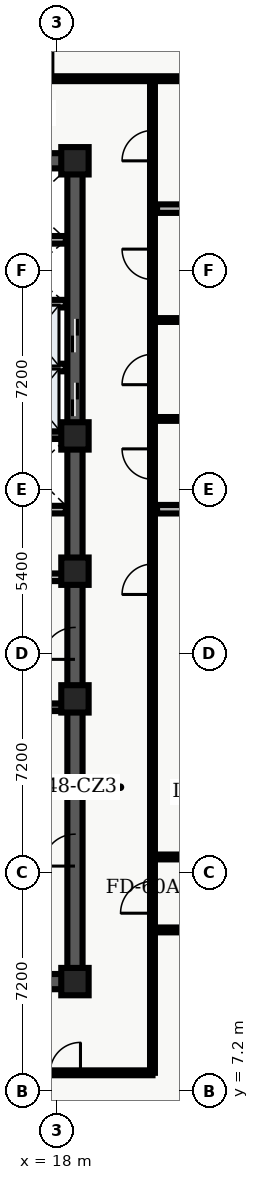
"""IFC4 building model, lengths in metres.
Left out: names, types, materials, properties, quantities, classifications, styles, units other than length and angle.
Written with IfcOpenShell. Run it as: python <this file> out.ifc"""

import sys

from ifc_helpers import new_model, entity, si_unit, converted_unit, direction, frame, origin_with_axes, origin_2d_with_axis, place, context, subcontext, project, spatial, polyline, rectangle, outline, extrude, element, fill, save


model = new_model("IFC4")
c1 = context("Model", 3, precision=1e-05, world=origin_with_axes(), true_north=direction((0.0, 1.0)))
c2 = subcontext(c1, "Body", "Model", "MODEL_VIEW")
j1 = project(units=[si_unit("LENGTHUNIT", "METRE"), converted_unit("PLANEANGLEUNIT", "DEGREE", entity("IfcPlaneAngleMeasure", 0.017), si_unit("PLANEANGLEUNIT", "RADIAN"), dimensions=[0, 0, 0, 0, 0, 0, 0])], contexts=[c1])
p1 = place(None, origin_with_axes())
s1 = spatial("IfcSite", under=j1, at=p1, CompositionType="ELEMENT")
p2 = place(p1, origin_with_axes())
s2 = spatial("IfcBuilding", under=s1, at=p2, CompositionType="ELEMENT")
p3 = place(p2, frame((0.0, 0.0, 196.5), z_axis=(0.0, 0.0, 1.0), x_axis=(1.0, 0.0, 0.0)))
s3 = spatial("IfcBuildingStorey", under=s2, at=p3, CompositionType="ELEMENT", Elevation=196.5)
p4 = place(p3, frame((11.4, 10.8, 0.0), z_axis=(0.0, 0.0, 1.0), x_axis=(1.0, 0.0, 0.0)))
e1 = element("IfcWall", 1, at=p4, inside=s3, PredefinedType="SHEAR", context=c2, shape_type="SweptSolid", body=[
    extrude(outline(polyline([(0.0, -0.25), (7.2, -0.25), (7.2, 0.25), (0.0, 0.25), (0.0, -0.25)])), origin_with_axes(), (0.0, 0.0, 1.0), 3.66),
])
p5 = place(p4, frame((2.625, 0.0, 0.0), z_axis=(0.0, 0.0, 1.0), x_axis=(1.0, 0.0, 0.0)))
e2 = element("IfcOpeningElement", 2, at=p5, cuts=e1, PredefinedType="OPENING", context=c2, shape_type="SweptSolid", body=[
    extrude(rectangle(XDim=1.05, YDim=0.52, at=origin_2d_with_axis()), origin_with_axes(), (0.0, 0.0, 1.0), 2.15),
])
p6 = place(p3, frame((11.4, 37.8, 0.0), z_axis=(0.0, 0.0, 1.0), x_axis=(1.0, 0.0, 0.0)))
e3 = element("IfcWall", 3, at=p6, inside=s3, PredefinedType="SHEAR", context=c2, shape_type="SweptSolid", body=[
    extrude(outline(polyline([(0.0, -0.25), (7.2, -0.25), (7.2, 0.25), (0.0, 0.25), (0.0, -0.25)])), origin_with_axes(), (0.0, 0.0, 1.0), 3.66),
])
p7 = place(p6, frame((2.625, 0.0, 0.0), z_axis=(0.0, 0.0, 1.0), x_axis=(1.0, 0.0, 0.0)))
e4 = element("IfcOpeningElement", 4, at=p7, cuts=e3, PredefinedType="OPENING", context=c2, shape_type="SweptSolid", body=[
    extrude(rectangle(XDim=1.05, YDim=0.52, at=origin_2d_with_axis()), origin_with_axes(), (0.0, 0.0, 1.0), 2.15),
])
p8 = place(p3, frame((18.6, 10.8, 0.0), z_axis=(0.0, 0.0, 1.0), x_axis=(0.0, 1.0, 0.0)))
e5 = element("IfcWall", 5, at=p8, inside=s3, PredefinedType="SHEAR", context=c2, shape_type="SweptSolid", body=[
    extrude(outline(polyline([(0.0, -0.25), (13.5, -0.25), (13.5, 0.25), (0.0, 0.25), (0.0, -0.25)])), origin_with_axes(), (0.0, 0.0, 1.0), 3.66),
])
p9 = place(p8, frame((11.125, 0.0, 0.0), z_axis=(0.0, 0.0, 1.0), x_axis=(1.0, 0.0, 0.0)))
e6 = element("IfcOpeningElement", 6, at=p9, cuts=e5, PredefinedType="OPENING", context=c2, shape_type="SweptSolid", body=[
    extrude(rectangle(XDim=1.05, YDim=0.52, at=origin_2d_with_axis()), origin_with_axes(), (0.0, 0.0, 1.0), 2.15),
])
p10 = place(p8, frame((4.325, 0.0, 0.0), z_axis=(0.0, 0.0, 1.0), x_axis=(1.0, 0.0, 0.0)))
e7 = element("IfcOpeningElement", 7, at=p10, cuts=e5, PredefinedType="OPENING", context=c2, shape_type="SweptSolid", body=[
    extrude(rectangle(XDim=1.05, YDim=0.52, at=origin_2d_with_axis()), origin_with_axes(), (0.0, 0.0, 1.0), 2.15),
])
p11 = place(p3, frame((18.6, 24.3, 0.0), z_axis=(0.0, 0.0, 1.0), x_axis=(0.0, 1.0, 0.0)))
e8 = element("IfcWall", 8, at=p11, inside=s3, PredefinedType="SHEAR", context=c2, shape_type="SweptSolid", body=[
    extrude(outline(polyline([(0.0, -0.25), (13.5, -0.25), (13.5, 0.25), (0.0, 0.25), (0.0, -0.25)])), origin_with_axes(), (0.0, 0.0, 1.0), 3.66),
])
p12 = place(p11, frame((5.65, 0.0, 0.0), z_axis=(0.0, 0.0, 1.0), x_axis=(1.0, 0.0, 0.0)))
e9 = element("IfcOpeningElement", 9, at=p12, cuts=e8, PredefinedType="OPENING", context=c2, shape_type="SweptSolid", body=[
    extrude(rectangle(XDim=1.1, YDim=0.52, at=origin_2d_with_axis()), origin_with_axes(), (0.0, 0.0, 1.0), 2.15),
])
p13 = place(p11, frame((7.75, 0.0, 0.0), z_axis=(0.0, 0.0, 1.0), x_axis=(1.0, 0.0, 0.0)))
e10 = element("IfcOpeningElement", 10, at=p13, cuts=e8, PredefinedType="OPENING", context=c2, shape_type="SweptSolid", body=[
    extrude(rectangle(XDim=1.1, YDim=0.52, at=origin_2d_with_axis()), origin_with_axes(), (0.0, 0.0, 1.0), 2.15),
])
for number, where, z_axis, x_axis in (
    (11, (11.65, 19.825, 0.0), (0.0, 0.0, 1.0), (1.0, 0.0, 0.0)),
    (12, (11.65, 28.775, 0.0), (0.0, 0.0, 1.0), (1.0, 0.0, 0.0)),
):
    element("IfcWall", number, at=place(p3, frame(where, z_axis=z_axis, x_axis=x_axis)), inside=s3, PredefinedType="SHEAR", context=c2, shape_type="SweptSolid", body=[
        extrude(outline(polyline([(0.0, -0.125), (6.7, -0.125), (6.7, 0.125), (0.0, 0.125), (0.0, -0.125)])), origin_with_axes(), (0.0, 0.0, 1.0), 3.66),
    ])
p14 = place(p3, frame((11.7, 24.1, 0.0), z_axis=(0.0, 0.0, 1.0), x_axis=(1.0, 0.0, 0.0)))
e13 = element("IfcWall", 13, at=p14, inside=s3, PredefinedType="SOLIDWALL", context=c2, shape_type="SweptSolid", body=[
    extrude(outline(polyline([(0.0, -0.125), (6.6, -0.125), (6.6, 0.125), (0.0, 0.125), (0.0, -0.125)])), origin_with_axes(), (0.0, 0.0, 1.0), 2.7),
])
p15 = place(p14, frame((3.75, 0.0, 0.0), z_axis=(0.0, 0.0, 1.0), x_axis=(1.0, 0.0, 0.0)))
e14 = element("IfcOpeningElement", 14, at=p15, cuts=e13, PredefinedType="OPENING", context=c2, shape_type="SweptSolid", body=[
    extrude(rectangle(XDim=0.9, YDim=0.27, at=origin_2d_with_axis()), origin_with_axes(), (0.0, 0.0, 1.0), 2.15),
])
p16 = place(p3, frame((11.7, 26.325, 0.0), z_axis=(0.0, 0.0, 1.0), x_axis=(1.0, 0.0, 0.0)))
e15 = element("IfcWall", 15, at=p16, inside=s3, PredefinedType="SOLIDWALL", context=c2, shape_type="SweptSolid", body=[
    extrude(outline(polyline([(0.0, -0.125), (6.6, -0.125), (6.6, 0.125), (0.0, 0.125), (0.0, -0.125)])), origin_with_axes(), (0.0, 0.0, 1.0), 2.7),
])
p17 = place(p16, frame((3.5, 0.0, 0.0), z_axis=(0.0, 0.0, 1.0), x_axis=(1.0, 0.0, 0.0)))
e16 = element("IfcOpeningElement", 16, at=p17, cuts=e15, PredefinedType="OPENING", context=c2, shape_type="SweptSolid", body=[
    extrude(rectangle(XDim=0.9, YDim=0.27, at=origin_2d_with_axis()), origin_with_axes(), (0.0, 0.0, 1.0), 2.15),
])
for number, where, z_axis, x_axis in (
    (17, (18.6, 10.8, 0.0), (0.0, 0.0, 1.0), (1.0, 0.0, 0.0)),
    (18, (18.6, 20.1, 0.0), (0.0, 0.0, 1.0), (1.0, 0.0, 0.0)),
    (19, (18.6, 24.3, 0.0), (0.0, 0.0, 1.0), (1.0, 0.0, 0.0)),
    (20, (18.6, 28.75, 0.0), (0.0, 0.0, 1.0), (1.0, 0.0, 0.0)),
    (21, (18.6, 37.8, 0.0), (0.0, 0.0, 1.0), (1.0, 0.0, 0.0)),
):
    element("IfcColumn", number, at=place(p3, frame(where, z_axis=z_axis, x_axis=x_axis)), inside=s3, PredefinedType="COLUMN", context=c2, shape_type="SweptSolid", body=[
        extrude(rectangle(XDim=0.9, YDim=0.9, at=origin_2d_with_axis()), origin_with_axes(), (0.0, 0.0, 1.0), 3.9),
    ])
for number, where, z_axis, x_axis in (
    (22, (15.84, 31.0, 0.0), (0.0, 0.0, 1.0), (1.0, 0.0, 0.0)),
    (23, (15.84, 33.1, 0.0), (0.0, 0.0, 1.0), (1.0, 0.0, 0.0)),
    (24, (15.84, 35.2, 0.0), (0.0, 0.0, 1.0), (1.0, 0.0, 0.0)),
):
    element("IfcWall", number, at=place(p3, frame(where, z_axis=z_axis, x_axis=x_axis)), inside=s3, PredefinedType="SOLIDWALL", context=c2, shape_type="SweptSolid", body=[
        extrude(outline(polyline([(0.0, -0.125), (2.46, -0.125), (2.46, 0.125), (0.0, 0.125), (0.0, -0.125)])), origin_with_axes(), (0.0, 0.0, 1.0), 2.7),
    ])
p18 = place(p3, frame((2.6, 7.8, 0.0), z_axis=(0.0, 0.0, 1.0), x_axis=(1.0, 0.0, 0.0)))
e25 = element("IfcWall", 25, at=p18, inside=s3, PredefinedType="PARTITIONING", context=c2, shape_type="SweptSolid", body=[
    extrude(outline(polyline([(0.0, -0.08), (18.55, -0.08), (18.55, 0.08), (0.0, 0.08), (0.0, -0.08)])), origin_with_axes(), (0.0, 0.0, 1.0), 2.7),
])
p19 = place(p18, frame((6.426, 0.0, 0.0), z_axis=(0.0, 0.0, 1.0), x_axis=(1.0, 0.0, 0.0)))
e26 = element("IfcOpeningElement", 26, at=p19, cuts=e25, PredefinedType="OPENING", context=c2, shape_type="SweptSolid", body=[
    extrude(rectangle(XDim=1.2, YDim=0.18, at=origin_2d_with_axis()), origin_with_axes(), (0.0, 0.0, 1.0), 2.2),
])
p20 = place(p18, frame((15.681, 0.0, 0.0), z_axis=(0.0, 0.0, 1.0), x_axis=(1.0, 0.0, 0.0)))
e27 = element("IfcOpeningElement", 27, at=p20, cuts=e25, PredefinedType="OPENING", context=c2, shape_type="SweptSolid", body=[
    extrude(rectangle(XDim=1.0, YDim=0.18, at=origin_2d_with_axis()), origin_with_axes(), (0.0, 0.0, 1.0), 2.15),
])
p21 = place(p3, frame((2.6, 40.5, 0.0), z_axis=(0.0, 0.0, 1.0), x_axis=(1.0, 0.0, 0.0)))
e28 = element("IfcWall", 28, at=p21, inside=s3, PredefinedType="PARTITIONING", context=c2, shape_type="SweptSolid", body=[
    extrude(outline(polyline([(0.0, -0.08), (25.444, -0.08), (25.444, 0.08), (0.0, 0.08), (0.0, -0.08)])), origin_with_axes(), (0.0, 0.0, 1.0), 2.7),
])
p22 = place(p21, frame((1.762, 0.0, 0.0), z_axis=(0.0, 0.0, 1.0), x_axis=(1.0, 0.0, 0.0)))
e29 = element("IfcOpeningElement", 29, at=p22, cuts=e28, PredefinedType="OPENING", context=c2, shape_type="SweptSolid", body=[
    extrude(rectangle(XDim=1.0, YDim=0.18, at=origin_2d_with_axis()), origin_with_axes(), (0.0, 0.0, 1.0), 2.15),
])
p23 = place(p21, frame((6.167, 0.0, 0.0), z_axis=(0.0, 0.0, 1.0), x_axis=(1.0, 0.0, 0.0)))
e30 = element("IfcOpeningElement", 30, at=p23, cuts=e28, PredefinedType="OPENING", context=c2, shape_type="SweptSolid", body=[
    extrude(rectangle(XDim=1.0, YDim=0.18, at=origin_2d_with_axis()), origin_with_axes(), (0.0, 0.0, 1.0), 2.15),
])
p24 = place(p21, frame((10.413, 0.0, 0.0), z_axis=(0.0, 0.0, 1.0), x_axis=(1.0, 0.0, 0.0)))
e31 = element("IfcOpeningElement", 31, at=p24, cuts=e28, PredefinedType="OPENING", context=c2, shape_type="SweptSolid", body=[
    extrude(rectangle(XDim=1.0, YDim=0.18, at=origin_2d_with_axis()), origin_with_axes(), (0.0, 0.0, 1.0), 2.15),
])
p25 = place(p21, frame((14.773, 0.0, 0.0), z_axis=(0.0, 0.0, 1.0), x_axis=(1.0, 0.0, 0.0)))
e32 = element("IfcOpeningElement", 32, at=p25, cuts=e28, PredefinedType="OPENING", context=c2, shape_type="SweptSolid", body=[
    extrude(rectangle(XDim=1.0, YDim=0.18, at=origin_2d_with_axis()), origin_with_axes(), (0.0, 0.0, 1.0), 2.15),
])
p26 = place(p3, frame((21.15, 7.8, 0.0), z_axis=(0.0, 0.0, 1.0), x_axis=(0.0, 1.0, 0.0)))
e33 = element("IfcWall", 33, at=p26, inside=s3, PredefinedType="PARTITIONING", context=c2, shape_type="SweptSolid", body=[
    extrude(outline(polyline([(0.0, -0.08), (32.7, -0.08), (32.7, 0.08), (0.0, 0.08), (0.0, -0.08)])), origin_with_axes(), (0.0, 0.0, 1.0), 2.7),
])
p27 = place(p26, frame((16.235, 0.0, 0.0), z_axis=(0.0, 0.0, 1.0), x_axis=(1.0, 0.0, 0.0)))
e34 = element("IfcOpeningElement", 34, at=p27, cuts=e33, PredefinedType="OPENING", context=c2, shape_type="SweptSolid", body=[
    extrude(rectangle(XDim=1.0, YDim=0.18, at=origin_2d_with_axis()), origin_with_axes(), (0.0, 0.0, 1.0), 2.15),
])
p28 = place(p26, frame((20.023, 0.0, 0.0), z_axis=(0.0, 0.0, 1.0), x_axis=(1.0, 0.0, 0.0)))
e35 = element("IfcOpeningElement", 35, at=p28, cuts=e33, PredefinedType="OPENING", context=c2, shape_type="SweptSolid", body=[
    extrude(rectangle(XDim=1.0, YDim=0.18, at=origin_2d_with_axis()), origin_with_axes(), (0.0, 0.0, 1.0), 2.15),
])
p29 = place(p26, frame((23.135, 0.0, 0.0), z_axis=(0.0, 0.0, 1.0), x_axis=(1.0, 0.0, 0.0)))
e36 = element("IfcOpeningElement", 36, at=p29, cuts=e33, PredefinedType="OPENING", context=c2, shape_type="SweptSolid", body=[
    extrude(rectangle(XDim=1.0, YDim=0.18, at=origin_2d_with_axis()), origin_with_axes(), (0.0, 0.0, 1.0), 2.15),
])
p30 = place(p26, frame((26.594, 0.0, 0.0), z_axis=(0.0, 0.0, 1.0), x_axis=(1.0, 0.0, 0.0)))
e37 = element("IfcOpeningElement", 37, at=p30, cuts=e33, PredefinedType="OPENING", context=c2, shape_type="SweptSolid", body=[
    extrude(rectangle(XDim=1.0, YDim=0.18, at=origin_2d_with_axis()), origin_with_axes(), (0.0, 0.0, 1.0), 2.15),
])
p31 = place(p26, frame((30.498, 0.0, 0.0), z_axis=(0.0, 0.0, 1.0), x_axis=(1.0, 0.0, 0.0)))
e38 = element("IfcOpeningElement", 38, at=p31, cuts=e33, PredefinedType="OPENING", context=c2, shape_type="SweptSolid", body=[
    extrude(rectangle(XDim=1.0, YDim=0.18, at=origin_2d_with_axis()), origin_with_axes(), (0.0, 0.0, 1.0), 2.15),
])
p32 = place(p26, frame((5.775, 0.0, 0.0), z_axis=(0.0, 0.0, 1.0), x_axis=(1.0, 0.0, 0.0)))
e39 = element("IfcOpeningElement", 39, at=p32, cuts=e33, PredefinedType="OPENING", context=c2, shape_type="SweptSolid", body=[
    extrude(rectangle(XDim=1.05, YDim=0.18, at=origin_2d_with_axis()), origin_with_axes(), (0.0, 0.0, 1.0), 2.15),
])
p33 = place(p3, frame((21.3, 26.339, 0.0), z_axis=(0.0, 0.0, 1.0), x_axis=(1.0, 0.0, 0.0)))
e40 = element("IfcWall", 40, at=p33, inside=s3, PredefinedType="PARTITIONING", context=c2, shape_type="SweptSolid", body=[
    extrude(outline(polyline([(0.0, -0.14), (6.744, -0.14), (6.744, 0.14), (0.0, 0.14), (0.0, -0.14)])), origin_with_axes(), (0.0, 0.0, 1.0), 2.7),
])
for number, where, z_axis, x_axis in (
    (41, (21.3, 29.308, 0.0), (0.0, 0.0, 1.0), (1.0, 0.0, 0.0)),
    (42, (21.3, 32.562, 0.0), (0.0, 0.0, 1.0), (1.0, 0.0, 0.0)),
):
    element("IfcWall", number, at=place(p3, frame(where, z_axis=z_axis, x_axis=x_axis)), inside=s3, PredefinedType="PARTITIONING", context=c2, shape_type="SweptSolid", body=[
        extrude(outline(polyline([(0.0, -0.062), (6.744, -0.062), (6.744, 0.062), (0.0, 0.062), (0.0, -0.062)])), origin_with_axes(), (0.0, 0.0, 1.0), 2.7),
    ])
p34 = place(p3, frame((21.3, 36.226, 0.0), z_axis=(0.0, 0.0, 1.0), x_axis=(1.0, 0.0, 0.0)))
e43 = element("IfcWall", 43, at=p34, inside=s3, PredefinedType="PARTITIONING", context=c2, shape_type="SweptSolid", body=[
    extrude(outline(polyline([(0.0, -0.14), (6.744, -0.14), (6.744, 0.14), (0.0, 0.14), (0.0, -0.14)])), origin_with_axes(), (0.0, 0.0, 1.0), 2.7),
])
p35 = place(p3, frame((21.15, 12.5, 0.0), z_axis=(0.0, 0.0, 1.0), x_axis=(1.0, 0.0, 0.0)))
e44 = element("IfcWall", 44, at=p35, inside=s3, PredefinedType="PARTITIONING", context=c2, shape_type="SweptSolid", body=[
    extrude(outline(polyline([(0.0, -0.08), (15.2, -0.08), (15.2, 0.08), (0.0, 0.08), (0.0, -0.08)])), origin_with_axes(), (0.0, 0.0, 1.0), 2.7),
])
p36 = place(p35, frame((3.315, 0.0, 0.0), z_axis=(0.0, 0.0, 1.0), x_axis=(1.0, 0.0, 0.0)))
e45 = element("IfcOpeningElement", 45, at=p36, cuts=e44, PredefinedType="OPENING", context=c2, shape_type="SweptSolid", body=[
    extrude(rectangle(XDim=1.0, YDim=0.18, at=origin_2d_with_axis()), origin_with_axes(), (0.0, 0.0, 1.0), 2.15),
])
p37 = place(p35, frame((7.639, 0.0, 0.0), z_axis=(0.0, 0.0, 1.0), x_axis=(1.0, 0.0, 0.0)))
e46 = element("IfcOpeningElement", 46, at=p37, cuts=e44, PredefinedType="OPENING", context=c2, shape_type="SweptSolid", body=[
    extrude(rectangle(XDim=1.0, YDim=0.18, at=origin_2d_with_axis()), origin_with_axes(), (0.0, 0.0, 1.0), 2.15),
])
p38 = place(p35, frame((10.313, 0.0, 0.0), z_axis=(0.0, 0.0, 1.0), x_axis=(1.0, 0.0, 0.0)))
e47 = element("IfcOpeningElement", 47, at=p38, cuts=e44, PredefinedType="OPENING", context=c2, shape_type="SweptSolid", body=[
    extrude(rectangle(XDim=1.0, YDim=0.18, at=origin_2d_with_axis()), origin_with_axes(), (0.0, 0.0, 1.0), 2.15),
])
p39 = place(p35, frame((13.179, 0.0, 0.0), z_axis=(0.0, 0.0, 1.0), x_axis=(1.0, 0.0, 0.0)))
e48 = element("IfcOpeningElement", 48, at=p39, cuts=e44, PredefinedType="OPENING", context=c2, shape_type="SweptSolid", body=[
    extrude(rectangle(XDim=1.0, YDim=0.18, at=origin_2d_with_axis()), origin_with_axes(), (0.0, 0.0, 1.0), 2.15),
])
p40 = place(p3, frame((21.15, 14.9, 0.0), z_axis=(0.0, 0.0, 1.0), x_axis=(1.0, 0.0, 0.0)))
e49 = element("IfcWall", 49, at=p40, inside=s3, PredefinedType="PARTITIONING", context=c2, shape_type="SweptSolid", body=[
    extrude(outline(polyline([(0.0, -0.08), (15.2, -0.08), (15.2, 0.08), (0.0, 0.08), (0.0, -0.08)])), origin_with_axes(), (0.0, 0.0, 1.0), 2.7),
])
p41 = place(p40, frame((7.65, 0.0, 0.0), z_axis=(0.0, 0.0, 1.0), x_axis=(1.0, 0.0, 0.0)))
e50 = element("IfcOpeningElement", 50, at=p41, cuts=e49, PredefinedType="OPENING", context=c2, shape_type="SweptSolid", body=[
    extrude(rectangle(XDim=1.2, YDim=0.18, at=origin_2d_with_axis()), origin_with_axes(), (0.0, 0.0, 1.0), 2.2),
])
p42 = place(p11, frame((5.65, 0.0, 0.0), z_axis=(0.0, 0.0, 1.0), x_axis=(1.0, 0.0, 0.0)))
e51 = element("IfcDoor", 51, at=p42, inside=s3, OperationType="SLIDING_TO_LEFT", PredefinedType="DOOR", context=c2, shape_type="SweptSolid", body=[
    extrude(rectangle(XDim=1.1, YDim=0.09, at=origin_2d_with_axis()), origin_with_axes(), (0.0, 0.0, 1.0), 2.15),
])
fill(e9, e51)
p43 = place(p11, frame((7.75, 0.0, 0.0), z_axis=(0.0, 0.0, 1.0), x_axis=(1.0, 0.0, 0.0)))
e52 = element("IfcDoor", 52, at=p43, inside=s3, OperationType="SLIDING_TO_RIGHT", PredefinedType="DOOR", context=c2, shape_type="SweptSolid", body=[
    extrude(rectangle(XDim=1.1, YDim=0.09, at=origin_2d_with_axis()), origin_with_axes(), (0.0, 0.0, 1.0), 2.15),
])
fill(e10, e52)
p44 = place(p8, frame((11.125, 0.0, 0.0), z_axis=(0.0, 0.0, 1.0), x_axis=(1.0, 0.0, 0.0)))
e53 = element("IfcDoor", 53, at=p44, inside=s3, OperationType="SINGLE_SWING_LEFT", PredefinedType="DOOR", context=c2, shape_type="SweptSolid", body=[
    extrude(rectangle(XDim=1.05, YDim=0.09, at=origin_2d_with_axis()), origin_with_axes(), (0.0, 0.0, 1.0), 2.15),
])
fill(e6, e53)
p45 = place(p8, frame((4.325, 0.0, 0.0), z_axis=(0.0, 0.0, 1.0), x_axis=(1.0, 0.0, 0.0)))
e54 = element("IfcDoor", 54, at=p45, inside=s3, OperationType="SINGLE_SWING_LEFT", PredefinedType="DOOR", context=c2, shape_type="SweptSolid", body=[
    extrude(rectangle(XDim=1.05, YDim=0.09, at=origin_2d_with_axis()), origin_with_axes(), (0.0, 0.0, 1.0), 2.15),
])
fill(e7, e54)
p46 = place(p18, frame((15.681, 0.0, 0.0), z_axis=(0.0, 0.0, 1.0), x_axis=(1.0, 0.0, 0.0)))
e55 = element("IfcDoor", 55, at=p46, inside=s3, OperationType="SINGLE_SWING_RIGHT", PredefinedType="DOOR", context=c2, shape_type="SweptSolid", body=[
    extrude(rectangle(XDim=1.0, YDim=0.09, at=origin_2d_with_axis()), origin_with_axes(), (0.0, 0.0, 1.0), 2.15),
])
fill(e27, e55)
p47 = place(p21, frame((14.773, 0.0, 0.0), z_axis=(0.0, 0.0, 1.0), x_axis=(1.0, 0.0, 0.0)))
e56 = element("IfcDoor", 56, at=p47, inside=s3, OperationType="SINGLE_SWING_RIGHT", PredefinedType="DOOR", context=c2, shape_type="SweptSolid", body=[
    extrude(rectangle(XDim=1.0, YDim=0.09, at=origin_2d_with_axis()), origin_with_axes(), (0.0, 0.0, 1.0), 2.15),
])
fill(e32, e56)
p48 = place(p26, frame((16.235, 0.0, 0.0), z_axis=(0.0, 0.0, 1.0), x_axis=(1.0, 0.0, 0.0)))
e57 = element("IfcDoor", 57, at=p48, inside=s3, OperationType="SINGLE_SWING_LEFT", PredefinedType="DOOR", context=c2, shape_type="SweptSolid", body=[
    extrude(rectangle(XDim=1.0, YDim=0.09, at=origin_2d_with_axis()), origin_with_axes(), (0.0, 0.0, 1.0), 2.15),
])
fill(e34, e57)
p49 = place(p26, frame((20.023, 0.0, 0.0), z_axis=(0.0, 0.0, 1.0), x_axis=(1.0, 0.0, 0.0)))
e58 = element("IfcDoor", 58, at=p49, inside=s3, OperationType="SINGLE_SWING_RIGHT", PredefinedType="DOOR", context=c2, shape_type="SweptSolid", body=[
    extrude(rectangle(XDim=1.0, YDim=0.09, at=origin_2d_with_axis()), origin_with_axes(), (0.0, 0.0, 1.0), 2.15),
])
fill(e35, e58)
p50 = place(p26, frame((23.135, 0.0, 0.0), z_axis=(0.0, 0.0, 1.0), x_axis=(1.0, 0.0, 0.0)))
e59 = element("IfcDoor", 59, at=p50, inside=s3, OperationType="SINGLE_SWING_LEFT", PredefinedType="DOOR", context=c2, shape_type="SweptSolid", body=[
    extrude(rectangle(XDim=1.0, YDim=0.09, at=origin_2d_with_axis()), origin_with_axes(), (0.0, 0.0, 1.0), 2.15),
])
fill(e36, e59)
p51 = place(p26, frame((26.594, 0.0, 0.0), z_axis=(0.0, 0.0, 1.0), x_axis=(1.0, 0.0, 0.0)))
e60 = element("IfcDoor", 60, at=p51, inside=s3, OperationType="SINGLE_SWING_RIGHT", PredefinedType="DOOR", context=c2, shape_type="SweptSolid", body=[
    extrude(rectangle(XDim=1.0, YDim=0.09, at=origin_2d_with_axis()), origin_with_axes(), (0.0, 0.0, 1.0), 2.15),
])
fill(e37, e60)
p52 = place(p26, frame((30.498, 0.0, 0.0), z_axis=(0.0, 0.0, 1.0), x_axis=(1.0, 0.0, 0.0)))
e61 = element("IfcDoor", 61, at=p52, inside=s3, OperationType="SINGLE_SWING_LEFT", PredefinedType="DOOR", context=c2, shape_type="SweptSolid", body=[
    extrude(rectangle(XDim=1.0, YDim=0.09, at=origin_2d_with_axis()), origin_with_axes(), (0.0, 0.0, 1.0), 2.15),
])
fill(e38, e61)
p53 = place(p26, frame((5.775, 0.0, 0.0), z_axis=(0.0, 0.0, 1.0), x_axis=(1.0, 0.0, 0.0)))
e62 = element("IfcDoor", 62, at=p53, inside=s3, OperationType="SINGLE_SWING_LEFT", PredefinedType="DOOR", context=c2, shape_type="SweptSolid", body=[
    extrude(rectangle(XDim=1.05, YDim=0.09, at=origin_2d_with_axis()), origin_with_axes(), (0.0, 0.0, 1.0), 2.15),
])
fill(e39, e62)
save(model, sys.argv[1])
